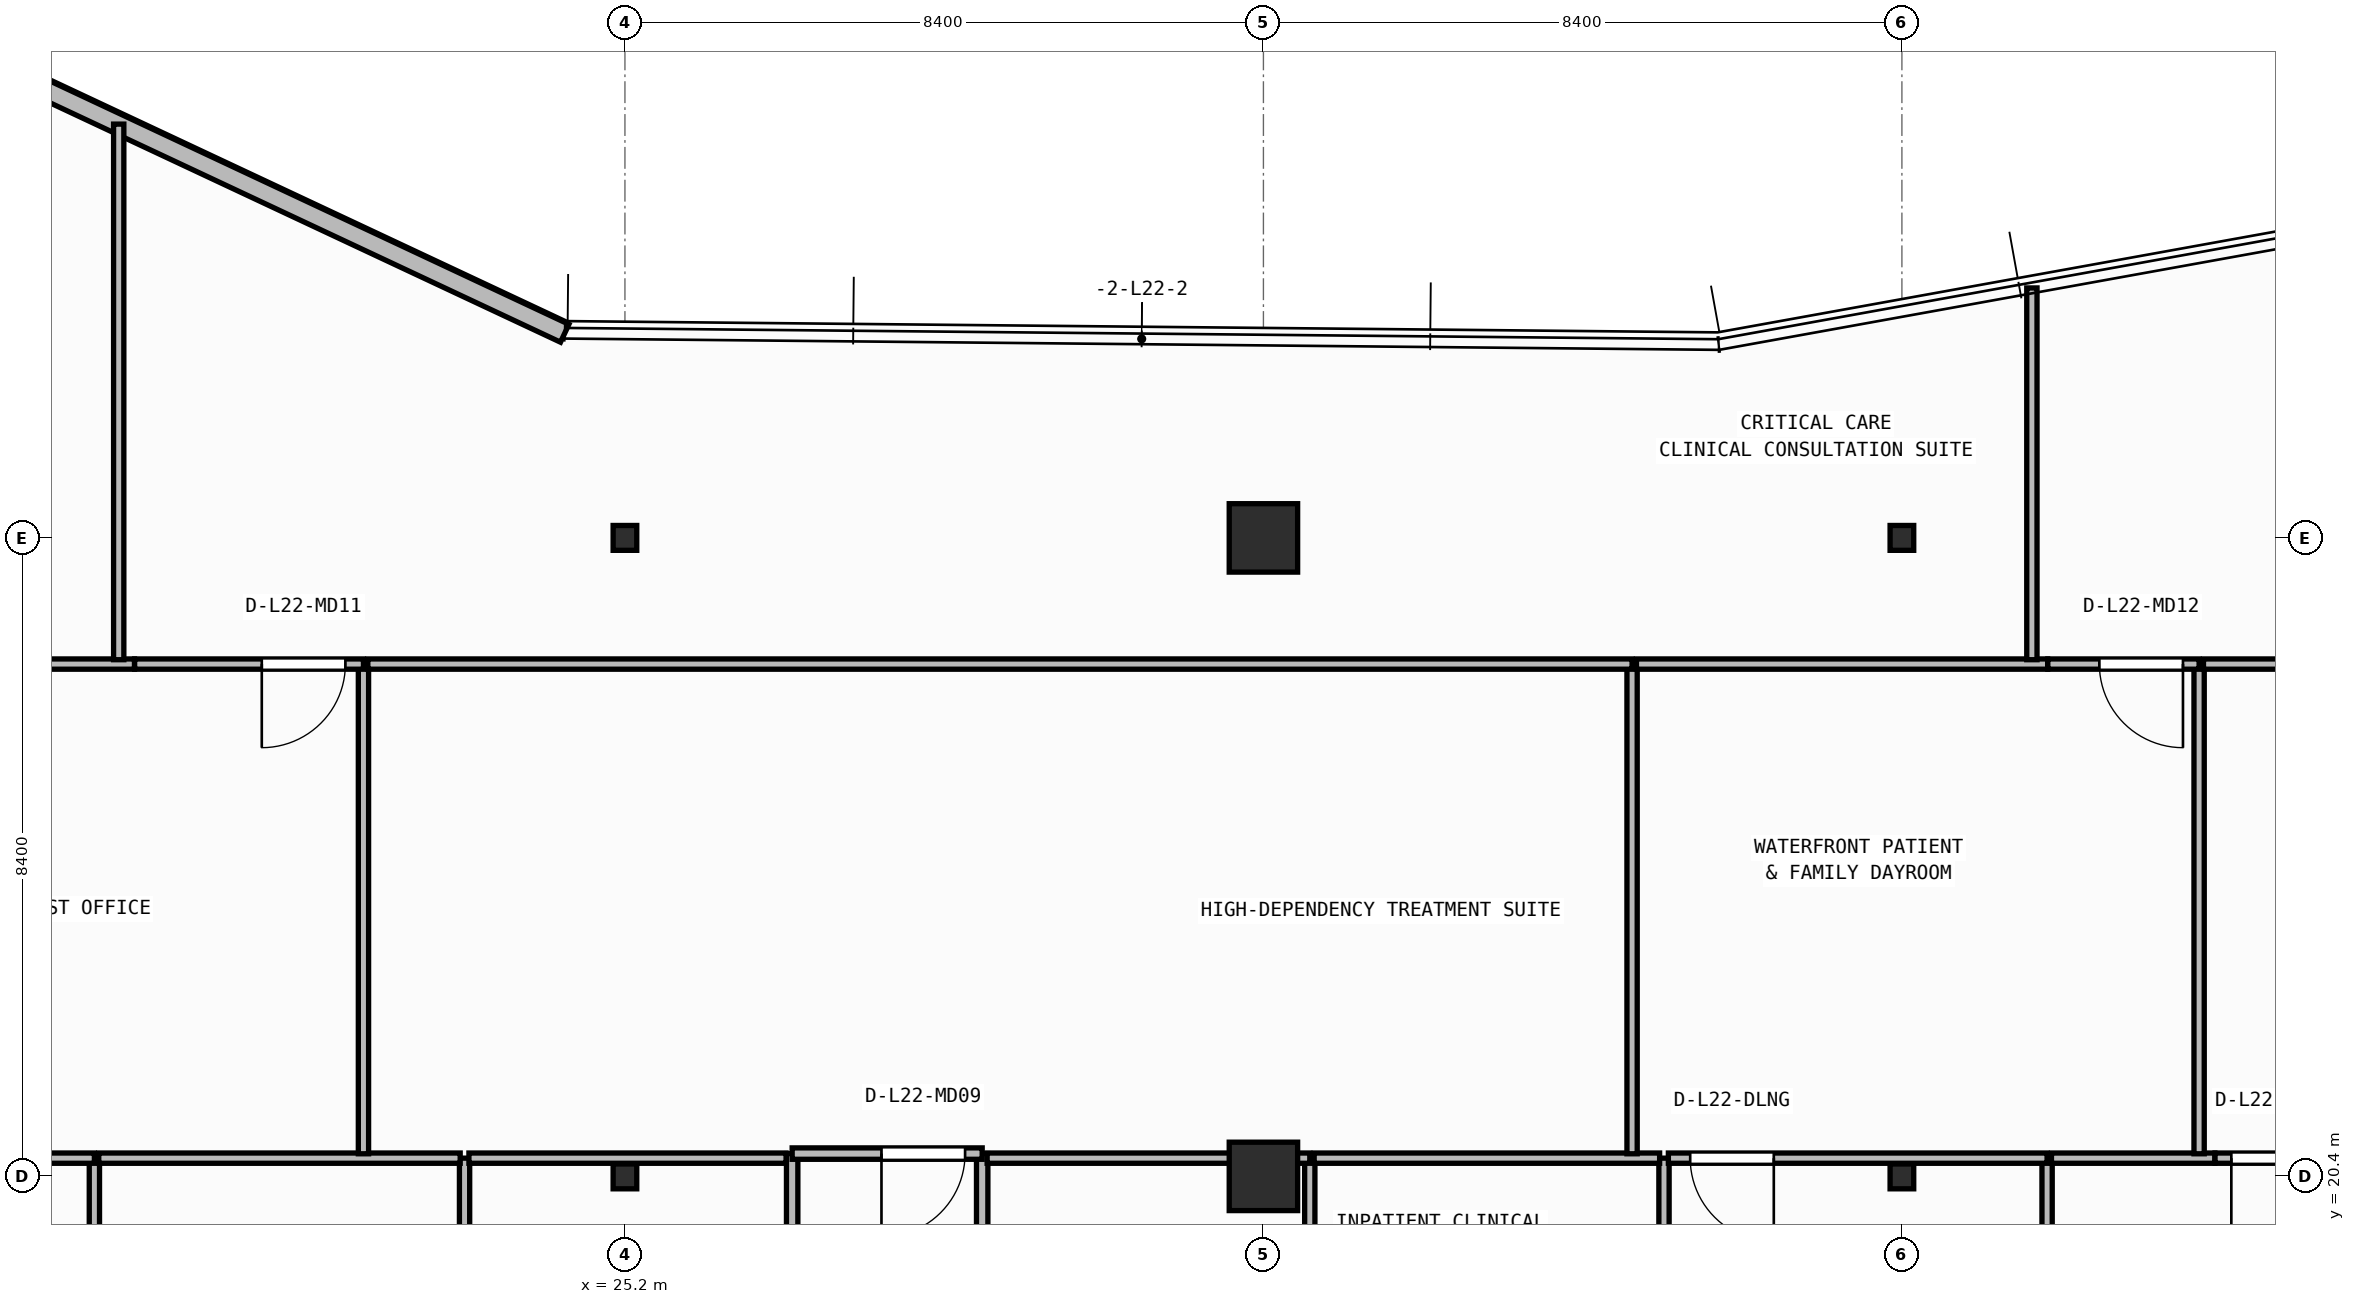
"""IFC4 building model, lengths in metres.
Left out: names, types, materials, properties, quantities, classifications, styles, units other than length and angle.
Written with IfcOpenShell. Run it as: python <this file> out.ifc"""

import sys

from ifc_helpers import new_model, si_unit, direction, frame, frame_2d, origin, origin_2d, place, context, subcontext, project, spatial, rectangle, i_section, extrude, element, fill, save


model = new_model("IFC4")
c1 = context("Model", 3, precision=1e-05, world=origin(), true_north=direction((0.0, 1.0)))
c2 = subcontext(c1, "Body", "Model", "MODEL_VIEW")
j1 = project(units=[si_unit("LENGTHUNIT", "METRE"), si_unit("PLANEANGLEUNIT", "RADIAN")], contexts=[c1])
p1 = place(None, origin())
s1 = spatial("IfcSite", under=j1, at=p1, CompositionType="ELEMENT")
p2 = place(p1, origin())
s2 = spatial("IfcBuilding", under=s1, at=p2, CompositionType="ELEMENT")
p3 = place(p2, frame((0.0, 0.0, 89.65)))
s3 = spatial("IfcBuildingStorey", under=s2, at=p3, CompositionType="ELEMENT", Elevation=89.65)
p4 = place(p3, frame((25.2, 20.4, 0.0), z_axis=(0.0, 0.0, 1.0), x_axis=(1.0, 0.0, 0.0)))
e1 = element("IfcColumn", 1, at=p4, inside=s3, PredefinedType="COLUMN", context=c2, shape_type="SweptSolid", body=[
    extrude(i_section(OverallWidth=0.311, OverallDepth=0.327, WebThickness=0.016, FlangeThickness=0.025, FilletRadius=0.017, at=origin_2d()), origin(), (0.0, 0.0, 1.0), 3.95),
])
p5 = place(p3, frame((33.6, 20.4, 0.0), z_axis=(0.0, 0.0, 1.0), x_axis=(1.0, 0.0, 0.0)))
e2 = element("IfcColumn", 2, at=p5, inside=s3, PredefinedType="COLUMN", context=c2, shape_type="SweptSolid", body=[
    extrude(rectangle(XDim=0.9, YDim=0.9, at=origin_2d()), origin(), (0.0, 0.0, 1.0), 3.95),
])
for number, where, z_axis, x_axis in (
    (3, (42.0, 20.4, 0.0), (0.0, 0.0, 1.0), (1.0, 0.0, 0.0)),
    (4, (25.2, 28.8, 0.0), (0.0, 0.0, 1.0), (1.0, 0.0, 0.0)),
):
    element("IfcColumn", number, at=place(p3, frame(where, z_axis=z_axis, x_axis=x_axis)), inside=s3, PredefinedType="COLUMN", context=c2, shape_type="SweptSolid", body=[
        extrude(i_section(OverallWidth=0.311, OverallDepth=0.327, WebThickness=0.016, FlangeThickness=0.025, FilletRadius=0.017, at=origin_2d()), origin(), (0.0, 0.0, 1.0), 3.95),
    ])
p6 = place(p3, frame((33.6, 28.8, 0.0), z_axis=(0.0, 0.0, 1.0), x_axis=(1.0, 0.0, 0.0)))
e5 = element("IfcColumn", 5, at=p6, inside=s3, PredefinedType="COLUMN", context=c2, shape_type="SweptSolid", body=[
    extrude(rectangle(XDim=0.9, YDim=0.9, at=origin_2d()), origin(), (0.0, 0.0, 1.0), 3.95),
])
p7 = place(p3, frame((42.0, 28.8, 0.0), z_axis=(0.0, 0.0, 1.0), x_axis=(1.0, 0.0, 0.0)))
e6 = element("IfcColumn", 6, at=p7, inside=s3, PredefinedType="COLUMN", context=c2, shape_type="SweptSolid", body=[
    extrude(i_section(OverallWidth=0.311, OverallDepth=0.327, WebThickness=0.016, FlangeThickness=0.025, FilletRadius=0.017, at=origin_2d()), origin(), (0.0, 0.0, 1.0), 3.95),
])
p8 = place(p3, frame((24.408, 31.492, 0.0), z_axis=(0.0, 0.0, 1.0), x_axis=(-0.905396522918, 0.424566998585, 0.0)))
e7 = element("IfcWall", 7, at=p8, inside=s3, PredefinedType="STANDARD", context=c2, shape_type="SweptSolid", body=[
    extrude(rectangle(XDim=14.189, YDim=0.26, at=frame_2d((7.095, 0.0))), origin(), (0.0, 0.0, 1.0), 3.71),
])
p9 = place(p8, frame((9.145, 0.0, 0.9)))
e8 = element("IfcOpeningElement", 8, at=p9, cuts=e7, PredefinedType="OPENING", context=c2, shape_type="SweptSolid", body=[
    extrude(rectangle(XDim=2.4, YDim=1.65, at=frame_2d((1.2, 0.825))), frame((0.0, 0.14, 0.0), z_axis=(0.0, -1.0, 0.0), x_axis=(1.0, 0.0, 0.0)), (0.0, 0.0, 1.0), 0.28),
])
for number, where, z_axis, x_axis in (
    (9, (27.4, 20.7, 0.0), (0.0, 0.0, 1.0), (0.0, -1.0, 0.0)),
    (10, (29.9, 14.7, 0.0), (0.0, 0.0, 1.0), (0.0, 1.0, 0.0)),
):
    element("IfcWall", number, at=place(p3, frame(where, z_axis=z_axis, x_axis=x_axis)), inside=s3, PredefinedType="PARTITIONING", context=c2, shape_type="SweptSolid", body=[
        extrude(rectangle(XDim=6.0, YDim=0.15, at=frame_2d((3.0, 0.0))), origin(), (0.0, 0.0, 1.0), 3.71),
    ])
p10 = place(p3, frame((29.9, 20.7, 0.0), z_axis=(0.0, 0.0, 1.0), x_axis=(-1.0, 0.0, 0.0)))
e11 = element("IfcWall", 11, at=p10, inside=s3, PredefinedType="PARTITIONING", context=c2, shape_type="SweptSolid", body=[
    extrude(rectangle(XDim=2.5, YDim=0.15, at=frame_2d((1.25, 0.0))), origin(), (0.0, 0.0, 1.0), 3.073),
])
p11 = place(p10, frame((0.225, 0.0, 0.0)))
e12 = element("IfcOpeningElement", 12, at=p11, cuts=e11, PredefinedType="OPENING", context=c2, shape_type="SweptSolid", body=[
    extrude(rectangle(XDim=1.1, YDim=2.1, at=frame_2d((0.55, 1.05))), frame((0.0, 0.085, 0.0), z_axis=(0.0, -1.0, 0.0), x_axis=(1.0, 0.0, 0.0)), (0.0, 0.0, 1.0), 0.17),
])
p12 = place(p3, frame((18.22, 17.833, 0.0), z_axis=(0.0, 0.0, 1.0), x_axis=(0.0, 1.0, 0.0)))
e13 = element("IfcWall", 13, at=p12, inside=s3, PredefinedType="PARTITIONING", context=c2, shape_type="SweptSolid", body=[
    extrude(rectangle(XDim=2.807, YDim=0.135, at=frame_2d((1.404, 0.0))), origin(), (0.0, 0.0, 1.0), 3.71),
])
p13 = place(p3, frame((18.22, 20.64, 0.0), z_axis=(0.0, 0.0, 1.0), x_axis=(-1.0, 0.0, 0.0)))
e14 = element("IfcWall", 14, at=p13, inside=s3, PredefinedType="PARTITIONING", context=c2, shape_type="SweptSolid", body=[
    extrude(rectangle(XDim=4.452, YDim=0.135, at=frame_2d((2.226, 0.0))), origin(), (0.0, 0.0, 1.0), 3.073),
])
p14 = place(p3, frame((23.09, 14.76, 0.0), z_axis=(0.0, 0.0, 1.0), x_axis=(0.0, 1.0, 0.0)))
e15 = element("IfcWall", 15, at=p14, inside=s3, PredefinedType="PARTITIONING", context=c2, shape_type="SweptSolid", body=[
    extrude(rectangle(XDim=5.88, YDim=0.135, at=frame_2d((2.94, 0.0))), origin(), (0.0, 0.0, 1.0), 3.71),
])
p15 = place(p3, frame((23.032, 20.64, 0.0), z_axis=(0.0, 0.0, 1.0), x_axis=(-1.0, 0.0, 0.0)))
e16 = element("IfcWall", 16, at=p15, inside=s3, PredefinedType="PARTITIONING", context=c2, shape_type="SweptSolid", body=[
    extrude(rectangle(XDim=4.755, YDim=0.135, at=frame_2d((2.377, 0.0))), origin(), (0.0, 0.0, 1.0), 3.073),
])
p16 = place(p3, frame((27.32, 20.64, 0.0), z_axis=(0.0, 0.0, 1.0), x_axis=(-1.0, 0.0, 0.0)))
e17 = element("IfcWall", 17, at=p16, inside=s3, PredefinedType="PARTITIONING", context=c2, shape_type="SweptSolid", body=[
    extrude(rectangle(XDim=4.173, YDim=0.135, at=frame_2d((2.086, 0.0))), origin(), (0.0, 0.0, 1.0), 3.073),
])
p17 = place(p3, frame((34.21, 17.833, 0.0), z_axis=(0.0, 0.0, 1.0), x_axis=(0.0, 1.0, 0.0)))
e18 = element("IfcWall", 18, at=p17, inside=s3, PredefinedType="PARTITIONING", context=c2, shape_type="SweptSolid", body=[
    extrude(rectangle(XDim=2.807, YDim=0.135, at=frame_2d((1.404, 0.0))), origin(), (0.0, 0.0, 1.0), 3.71),
])
p18 = place(p3, frame((34.21, 20.64, 0.0), z_axis=(0.0, 0.0, 1.0), x_axis=(-1.0, 0.0, 0.0)))
e19 = element("IfcWall", 19, at=p18, inside=s3, PredefinedType="PARTITIONING", context=c2, shape_type="SweptSolid", body=[
    extrude(rectangle(XDim=4.245, YDim=0.135, at=frame_2d((2.123, 0.0))), origin(), (0.0, 0.0, 1.0), 3.073),
])
p19 = place(p3, frame((38.87, 14.76, 0.0), z_axis=(0.0, 0.0, 1.0), x_axis=(0.0, 1.0, 0.0)))
e20 = element("IfcWall", 20, at=p19, inside=s3, PredefinedType="PARTITIONING", context=c2, shape_type="SweptSolid", body=[
    extrude(rectangle(XDim=5.88, YDim=0.135, at=frame_2d((2.94, 0.0))), origin(), (0.0, 0.0, 1.0), 3.71),
])
p20 = place(p3, frame((38.812, 20.64, 0.0), z_axis=(0.0, 0.0, 1.0), x_axis=(-1.0, 0.0, 0.0)))
e21 = element("IfcWall", 21, at=p20, inside=s3, PredefinedType="PARTITIONING", context=c2, shape_type="SweptSolid", body=[
    extrude(rectangle(XDim=4.545, YDim=0.135, at=frame_2d((2.272, 0.0))), origin(), (0.0, 0.0, 1.0), 3.073),
])
p21 = place(p3, frame((43.91, 17.833, 0.0), z_axis=(0.0, 0.0, 1.0), x_axis=(0.0, 1.0, 0.0)))
e22 = element("IfcWall", 22, at=p21, inside=s3, PredefinedType="PARTITIONING", context=c2, shape_type="SweptSolid", body=[
    extrude(rectangle(XDim=2.807, YDim=0.135, at=frame_2d((1.404, 0.0))), origin(), (0.0, 0.0, 1.0), 3.71),
])
p22 = place(p3, frame((43.91, 20.64, 0.0), z_axis=(0.0, 0.0, 1.0), x_axis=(-1.0, 0.0, 0.0)))
e23 = element("IfcWall", 23, at=p22, inside=s3, PredefinedType="PARTITIONING", context=c2, shape_type="SweptSolid", body=[
    extrude(rectangle(XDim=4.982, YDim=0.135, at=frame_2d((2.491, 0.0))), origin(), (0.0, 0.0, 1.0), 3.073),
])
p23 = place(p22, frame((3.595, 0.0, 0.0)))
e24 = element("IfcOpeningElement", 24, at=p23, cuts=e23, PredefinedType="OPENING", context=c2, shape_type="SweptSolid", body=[
    extrude(rectangle(XDim=1.1, YDim=2.1, at=frame_2d((0.55, 1.05))), frame((0.0, 0.077, 0.0), z_axis=(0.0, -1.0, 0.0), x_axis=(1.0, 0.0, 0.0)), (0.0, 0.0, 1.0), 0.155),
])
p24 = place(p3, frame((46.117, 20.64, 0.0), z_axis=(0.0, 0.0, 1.0), x_axis=(-1.0, 0.0, 0.0)))
e25 = element("IfcWall", 25, at=p24, inside=s3, PredefinedType="PARTITIONING", context=c2, shape_type="SweptSolid", body=[
    extrude(rectangle(XDim=2.15, YDim=0.135, at=frame_2d((1.075, 0.0))), origin(), (0.0, 0.0, 1.0), 3.073),
])
p25 = place(p3, frame((48.2, 20.64, 0.0), z_axis=(0.0, 0.0, 1.0), x_axis=(-1.0, 0.0, 0.0)))
e26 = element("IfcWall", 26, at=p25, inside=s3, PredefinedType="PARTITIONING", context=c2, shape_type="SweptSolid", body=[
    extrude(rectangle(XDim=2.081, YDim=0.135, at=frame_2d((1.04, 0.0))), origin(), (0.0, 0.0, 1.0), 3.073),
])
p26 = place(p25, frame((0.766, 0.0, 0.0)))
e27 = element("IfcOpeningElement", 27, at=p26, cuts=e26, PredefinedType="OPENING", context=c2, shape_type="SweptSolid", body=[
    extrude(rectangle(XDim=1.1, YDim=2.1, at=frame_2d((0.55, 1.05))), frame((0.0, 0.077, 0.0), z_axis=(0.0, -1.0, 0.0), x_axis=(1.0, 0.0, 0.0)), (0.0, 0.0, 1.0), 0.155),
])
p27 = place(p3, frame((21.76, 20.698, 0.0), z_axis=(0.0, 0.0, 1.0), x_axis=(0.0, 1.0, 0.0)))
e28 = element("IfcWall", 28, at=p27, inside=s3, PredefinedType="PARTITIONING", context=c2, shape_type="SweptSolid", body=[
    extrude(rectangle(XDim=6.442, YDim=0.135, at=frame_2d((3.221, 0.0))), origin(), (0.0, 0.0, 1.0), 3.71),
])
p28 = place(p3, frame((18.748, 27.14, 0.0), z_axis=(0.0, 0.0, 1.0), x_axis=(-1.0, 0.0, 0.0)))
e29 = element("IfcWall", 29, at=p28, inside=s3, PredefinedType="PARTITIONING", context=c2, shape_type="SweptSolid", body=[
    extrude(rectangle(XDim=9.1, YDim=0.135, at=frame_2d((4.55, 0.0))), origin(), (0.0, 0.0, 1.0), 3.71),
])
p29 = place(p3, frame((21.76, 27.14, 0.0), z_axis=(0.0, 0.0, 1.0), x_axis=(-1.0, 0.0, 0.0)))
e30 = element("IfcWall", 30, at=p29, inside=s3, PredefinedType="PARTITIONING", context=c2, shape_type="SweptSolid", body=[
    extrude(rectangle(XDim=3.01, YDim=0.135, at=frame_2d((1.505, 0.0))), origin(), (0.0, 0.0, 1.0), 3.71),
])
p30 = place(p29, frame((0.238, 0.0, 0.0)))
e31 = element("IfcOpeningElement", 31, at=p30, cuts=e30, PredefinedType="OPENING", context=c2, shape_type="SweptSolid", body=[
    extrude(rectangle(XDim=1.1, YDim=2.1, at=frame_2d((0.55, 1.05))), frame((0.0, 0.077, 0.0), z_axis=(0.0, -1.0, 0.0), x_axis=(1.0, 0.0, 0.0)), (0.0, 0.0, 1.0), 0.155),
])
p31 = place(p3, frame((38.45, 20.698, 0.0), z_axis=(0.0, 0.0, 1.0), x_axis=(0.0, 1.0, 0.0)))
e32 = element("IfcWall", 32, at=p31, inside=s3, PredefinedType="PARTITIONING", context=c2, shape_type="SweptSolid", body=[
    extrude(rectangle(XDim=6.442, YDim=0.135, at=frame_2d((3.221, 0.0))), origin(), (0.0, 0.0, 1.0), 3.71),
])
p32 = place(p3, frame((38.45, 27.14, 0.0), z_axis=(0.0, 0.0, 1.0), x_axis=(-1.0, 0.0, 0.0)))
e33 = element("IfcWall", 33, at=p32, inside=s3, PredefinedType="PARTITIONING", context=c2, shape_type="SweptSolid", body=[
    extrude(rectangle(XDim=16.633, YDim=0.135, at=frame_2d((8.316, 0.0))), origin(), (0.0, 0.0, 1.0), 3.71),
])
p33 = place(p3, frame((45.91, 20.698, 0.0), z_axis=(0.0, 0.0, 1.0), x_axis=(0.0, 1.0, 0.0)))
e34 = element("IfcWall", 34, at=p33, inside=s3, PredefinedType="PARTITIONING", context=c2, shape_type="SweptSolid", body=[
    extrude(rectangle(XDim=6.442, YDim=0.135, at=frame_2d((3.221, 0.0))), origin(), (0.0, 0.0, 1.0), 3.71),
])
p34 = place(p3, frame((43.917, 27.14, 0.0), z_axis=(0.0, 0.0, 1.0), x_axis=(-1.0, 0.0, 0.0)))
e35 = element("IfcWall", 35, at=p34, inside=s3, PredefinedType="PARTITIONING", context=c2, shape_type="SweptSolid", body=[
    extrude(rectangle(XDim=5.41, YDim=0.135, at=frame_2d((2.705, 0.0))), origin(), (0.0, 0.0, 1.0), 3.71),
])
p35 = place(p3, frame((45.91, 27.14, 0.0), z_axis=(0.0, 0.0, 1.0), x_axis=(-1.0, 0.0, 0.0)))
e36 = element("IfcWall", 36, at=p35, inside=s3, PredefinedType="PARTITIONING", context=c2, shape_type="SweptSolid", body=[
    extrude(rectangle(XDim=1.99, YDim=0.135, at=frame_2d((0.995, 0.0))), origin(), (0.0, 0.0, 1.0), 3.71),
])
p36 = place(p35, frame((0.212, 0.0, 0.0)))
e37 = element("IfcOpeningElement", 37, at=p36, cuts=e36, PredefinedType="OPENING", context=c2, shape_type="SweptSolid", body=[
    extrude(rectangle(XDim=1.1, YDim=2.1, at=frame_2d((0.55, 1.05))), frame((0.0, 0.077, 0.0), z_axis=(0.0, -1.0, 0.0), x_axis=(1.0, 0.0, 0.0)), (0.0, 0.0, 1.0), 0.155),
])
p37 = place(p3, frame((57.96, 27.14, 0.0), z_axis=(0.0, 0.0, 1.0), x_axis=(-1.0, 0.0, 0.0)))
e38 = element("IfcWall", 38, at=p37, inside=s3, PredefinedType="PARTITIONING", context=c2, shape_type="SweptSolid", body=[
    extrude(rectangle(XDim=11.992, YDim=0.135, at=frame_2d((5.996, 0.0))), origin(), (0.0, 0.0, 1.0), 3.71),
])
p38 = place(p3, frame((18.54, 27.198, 0.0), z_axis=(0.0, 0.0, 1.0), x_axis=(0.0, 1.0, 0.0)))
e39 = element("IfcWall", 39, at=p38, inside=s3, PredefinedType="PARTITIONING", context=c2, shape_type="SweptSolid", body=[
    extrude(rectangle(XDim=7.046, YDim=0.135, at=frame_2d((3.523, 0.0))), origin(), (0.0, 0.0, 1.0), 3.71),
])
p39 = place(p3, frame((43.71, 27.198, 0.0), z_axis=(0.0, 0.0, 1.0), x_axis=(0.0, 1.0, 0.0)))
e40 = element("IfcWall", 40, at=p39, inside=s3, PredefinedType="PARTITIONING", context=c2, shape_type="SweptSolid", body=[
    extrude(rectangle(XDim=4.891, YDim=0.135, at=frame_2d((2.445, 0.0))), origin(), (0.0, 0.0, 1.0), 3.71),
])
p40 = place(p11, origin())
e41 = element("IfcDoor", 41, at=p40, inside=s3, OperationType="SINGLE_SWING_RIGHT", PredefinedType="DOOR", context=c2, shape_type="SweptSolid", body=[
    extrude(rectangle(XDim=1.1, YDim=2.1, at=frame_2d((0.55, 1.05))), frame((0.0, 0.025, 0.0), z_axis=(0.0, -1.0, 0.0), x_axis=(1.0, 0.0, 0.0)), (0.0, 0.0, 1.0), 0.05),
])
fill(e12, e41)
p41 = place(p23, origin())
e42 = element("IfcDoor", 42, at=p41, inside=s3, OperationType="SINGLE_SWING_LEFT", PredefinedType="DOOR", context=c2, shape_type="SweptSolid", body=[
    extrude(rectangle(XDim=1.1, YDim=2.1, at=frame_2d((0.55, 1.05))), frame((0.0, 0.025, 0.0), z_axis=(0.0, -1.0, 0.0), x_axis=(1.0, 0.0, 0.0)), (0.0, 0.0, 1.0), 0.05),
])
fill(e24, e42)
p42 = place(p26, origin())
e43 = element("IfcDoor", 43, at=p42, inside=s3, OperationType="SINGLE_SWING_RIGHT", PredefinedType="DOOR", context=c2, shape_type="SweptSolid", body=[
    extrude(rectangle(XDim=1.1, YDim=2.1, at=frame_2d((0.55, 1.05))), frame((0.0, 0.025, 0.0), z_axis=(0.0, -1.0, 0.0), x_axis=(1.0, 0.0, 0.0)), (0.0, 0.0, 1.0), 0.05),
])
fill(e27, e43)
p43 = place(p30, origin())
e44 = element("IfcDoor", 44, at=p43, inside=s3, OperationType="SINGLE_SWING_RIGHT", PredefinedType="DOOR", context=c2, shape_type="SweptSolid", body=[
    extrude(rectangle(XDim=1.1, YDim=2.1, at=frame_2d((0.55, 1.05))), frame((0.0, 0.025, 0.0), z_axis=(0.0, -1.0, 0.0), x_axis=(1.0, 0.0, 0.0)), (0.0, 0.0, 1.0), 0.05),
])
fill(e31, e44)
p44 = place(p36, origin())
e45 = element("IfcDoor", 45, at=p44, inside=s3, OperationType="SINGLE_SWING_LEFT", PredefinedType="DOOR", context=c2, shape_type="SweptSolid", body=[
    extrude(rectangle(XDim=1.1, YDim=2.1, at=frame_2d((0.55, 1.05))), frame((0.0, 0.025, 0.0), z_axis=(0.0, -1.0, 0.0), x_axis=(1.0, 0.0, 0.0)), (0.0, 0.0, 1.0), 0.05),
])
fill(e37, e45)
save(model, sys.argv[1])
